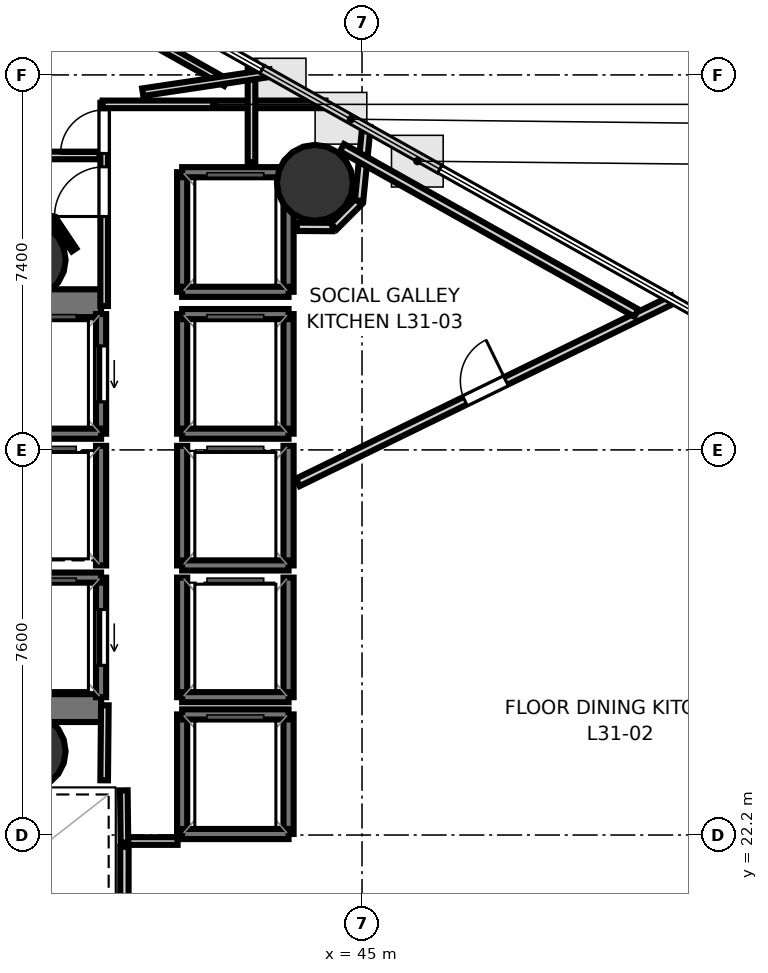
"""IFC4 building model, lengths in metres.
Left out: names, types, materials, properties, quantities, classifications, styles, units other than length and angle.
Written with IfcOpenShell. Run it as: python <this file> out.ifc"""

import sys

from ifc_helpers import new_model, si_unit, direction, frame, frame_2d, origin, origin_2d, place, context, subcontext, project, spatial, rectangle, hollow_circle, extrude, element, fill, save


model = new_model("IFC4")
c1 = context("Model", 3, precision=1e-05, world=origin(), true_north=direction((0.0, 1.0)))
c2 = subcontext(c1, "Body", "Model", "MODEL_VIEW")
j1 = project(units=[si_unit("LENGTHUNIT", "METRE"), si_unit("PLANEANGLEUNIT", "RADIAN")], contexts=[c1])
p1 = place(None, origin())
s1 = spatial("IfcSite", under=j1, at=p1, CompositionType="ELEMENT")
p2 = place(p1, origin())
s2 = spatial("IfcBuilding", under=s1, at=p2, CompositionType="ELEMENT")
p3 = place(p2, frame((0.0, 0.0, 123.7)))
s3 = spatial("IfcBuildingStorey", under=s2, at=p3, CompositionType="ELEMENT", Elevation=123.7)
p4 = place(p3, frame((29.23, 32.695, 0.0), z_axis=(0.0, 0.0, 1.0), x_axis=(1.0, 0.0, 0.0)))
e1 = element("IfcWall", 1, at=p4, inside=s3, PredefinedType="SHEAR", context=c2, shape_type="SweptSolid", body=[
    extrude(rectangle(XDim=10.62, YDim=0.55, at=frame_2d((5.31, 0.0))), origin(), (0.0, 0.0, 1.0), 3.52),
])
p5 = place(p4, frame((0.995, 0.0, 0.0)))
e2 = element("IfcOpeningElement", 2, at=p5, cuts=e1, PredefinedType="OPENING", context=c2, shape_type="SweptSolid", body=[
    extrude(rectangle(XDim=1.25, YDim=2.15, at=frame_2d((0.625, 1.075))), frame((0.0, 0.285, 0.0), z_axis=(0.0, -1.0, 0.0), x_axis=(1.0, 0.0, 0.0)), (0.0, 0.0, 1.0), 0.57),
])
p6 = place(p3, frame((29.23, 24.705, 0.0), z_axis=(0.0, 0.0, 1.0), x_axis=(1.0, 0.0, 0.0)))
e3 = element("IfcWall", 3, at=p6, inside=s3, PredefinedType="SHEAR", context=c2, shape_type="SweptSolid", body=[
    extrude(rectangle(XDim=10.62, YDim=0.55, at=frame_2d((5.31, 0.0))), origin(), (0.0, 0.0, 1.0), 3.52),
])
p7 = place(p6, frame((0.795, 0.0, 0.0)))
e4 = element("IfcOpeningElement", 4, at=p7, cuts=e3, PredefinedType="OPENING", context=c2, shape_type="SweptSolid", body=[
    extrude(rectangle(XDim=1.25, YDim=2.15, at=frame_2d((0.625, 1.075))), frame((0.0, 0.285, 0.0), z_axis=(0.0, -1.0, 0.0), x_axis=(1.0, 0.0, 0.0)), (0.0, 0.0, 1.0), 0.57),
])
for number, where, z_axis, x_axis in (
    (5, (38.4, 33.55, 0.0), (0.0, 0.0, 1.0), (1.0, 0.0, 0.0)),
    (6, (38.4, 23.85, 0.0), (0.0, 0.0, 1.0), (1.0, 0.0, 0.0)),
    (7, (44.071, 35.07, 0.0), (0.0, 0.0, 1.0), (1.0, 0.0, 0.0)),
):
    element("IfcColumn", number, at=place(p3, frame(where, z_axis=z_axis, x_axis=x_axis)), inside=s3, PredefinedType="COLUMN", context=c2, shape_type="SweptSolid", body=[
        extrude(hollow_circle(Radius=0.75, WallThickness=0.036, at=origin_2d()), origin(), (0.0, 0.0, 1.0), 3.7),
    ])
p8 = place(p3, frame((39.85, 30.12, 0.0), z_axis=(0.0, 0.0, 1.0), x_axis=(0.0, 1.0, 0.0)))
e8 = element("IfcWall", 8, at=p8, inside=s3, PredefinedType="SOLIDWALL", context=c2, shape_type="SweptSolid", body=[
    extrude(rectangle(XDim=2.36, YDim=0.2, at=frame_2d((1.18, 0.0))), origin(), (0.0, 0.0, 1.0), 3.52),
])
p9 = place(p8, frame((0.63, 0.0, 0.0)))
e9 = element("IfcOpeningElement", 9, at=p9, cuts=e8, PredefinedType="OPENING", context=c2, shape_type="SweptSolid", body=[
    extrude(rectangle(XDim=1.1, YDim=2.15, at=frame_2d((0.55, 1.075))), frame((0.0, 0.11, 0.0), z_axis=(0.0, -1.0, 0.0), x_axis=(1.0, 0.0, 0.0)), (0.0, 0.0, 1.0), 0.22),
])
p10 = place(p3, frame((37.75, 30.12, 0.0), z_axis=(0.0, 0.0, 1.0), x_axis=(1.0, 0.0, 0.0)))
e10 = element("IfcWall", 10, at=p10, inside=s3, PredefinedType="SOLIDWALL", context=c2, shape_type="SweptSolid", body=[
    extrude(rectangle(XDim=2.1, YDim=0.2, at=frame_2d((1.05, 0.0))), origin(), (0.0, 0.0, 1.0), 3.52),
])
p11 = place(p3, frame((39.85, 24.92, 0.0), z_axis=(0.0, 0.0, 1.0), x_axis=(0.0, 1.0, 0.0)))
e11 = element("IfcWall", 11, at=p11, inside=s3, PredefinedType="SOLIDWALL", context=c2, shape_type="SweptSolid", body=[
    extrude(rectangle(XDim=2.36, YDim=0.2, at=frame_2d((1.18, 0.0))), origin(), (0.0, 0.0, 1.0), 3.52),
])
p12 = place(p11, frame((0.63, 0.0, 0.0)))
e12 = element("IfcOpeningElement", 12, at=p12, cuts=e11, PredefinedType="OPENING", context=c2, shape_type="SweptSolid", body=[
    extrude(rectangle(XDim=1.1, YDim=2.15, at=frame_2d((0.55, 1.075))), frame((0.0, 0.11, 0.0), z_axis=(0.0, -1.0, 0.0), x_axis=(1.0, 0.0, 0.0)), (0.0, 0.0, 1.0), 0.22),
])
p13 = place(p3, frame((37.75, 27.28, 0.0), z_axis=(0.0, 0.0, 1.0), x_axis=(1.0, 0.0, 0.0)))
e13 = element("IfcWall", 13, at=p13, inside=s3, PredefinedType="SOLIDWALL", context=c2, shape_type="SweptSolid", body=[
    extrude(rectangle(XDim=2.1, YDim=0.2, at=frame_2d((1.05, 0.0))), origin(), (0.0, 0.0, 1.0), 3.52),
])
for number, where, z_axis, x_axis in (
    (14, (43.55, 30.12, 0.0), (0.0, 0.0, 1.0), (0.0, 1.0, 0.0)),
    (15, (41.45, 30.12, 0.0), (0.0, 0.0, 1.0), (0.0, 1.0, 0.0)),
):
    element("IfcWall", number, at=place(p3, frame(where, z_axis=z_axis, x_axis=x_axis)), inside=s3, PredefinedType="SOLIDWALL", context=c2, shape_type="SweptSolid", body=[
        extrude(rectangle(XDim=2.36, YDim=0.2, at=frame_2d((1.18, 0.0))), origin(), (0.0, 0.0, 1.0), 3.52),
    ])
for number, where, z_axis, x_axis in (
    (16, (41.45, 32.48, 0.0), (0.0, 0.0, 1.0), (1.0, 0.0, 0.0)),
    (17, (41.45, 30.12, 0.0), (0.0, 0.0, 1.0), (1.0, 0.0, 0.0)),
):
    element("IfcWall", number, at=place(p3, frame(where, z_axis=z_axis, x_axis=x_axis)), inside=s3, PredefinedType="SOLIDWALL", context=c2, shape_type="SweptSolid", body=[
        extrude(rectangle(XDim=2.1, YDim=0.2, at=frame_2d((1.05, 0.0))), origin(), (0.0, 0.0, 1.0), 3.52),
    ])
for number, where, z_axis, x_axis in (
    (18, (43.55, 27.52, 0.0), (0.0, 0.0, 1.0), (0.0, 1.0, 0.0)),
    (19, (41.45, 27.52, 0.0), (0.0, 0.0, 1.0), (0.0, 1.0, 0.0)),
):
    element("IfcWall", number, at=place(p3, frame(where, z_axis=z_axis, x_axis=x_axis)), inside=s3, PredefinedType="SOLIDWALL", context=c2, shape_type="SweptSolid", body=[
        extrude(rectangle(XDim=2.36, YDim=0.2, at=frame_2d((1.18, 0.0))), origin(), (0.0, 0.0, 1.0), 3.52),
    ])
p14 = place(p3, frame((41.45, 27.52, 0.0), z_axis=(0.0, 0.0, 1.0), x_axis=(1.0, 0.0, 0.0)))
e20 = element("IfcWall", 20, at=p14, inside=s3, PredefinedType="SOLIDWALL", context=c2, shape_type="SweptSolid", body=[
    extrude(rectangle(XDim=2.1, YDim=0.2, at=frame_2d((1.05, 0.0))), origin(), (0.0, 0.0, 1.0), 3.52),
])
for number, where, z_axis, x_axis in (
    (21, (43.55, 24.92, 0.0), (0.0, 0.0, 1.0), (0.0, 1.0, 0.0)),
    (22, (41.45, 24.92, 0.0), (0.0, 0.0, 1.0), (0.0, 1.0, 0.0)),
):
    element("IfcWall", number, at=place(p3, frame(where, z_axis=z_axis, x_axis=x_axis)), inside=s3, PredefinedType="SOLIDWALL", context=c2, shape_type="SweptSolid", body=[
        extrude(rectangle(XDim=2.36, YDim=0.2, at=frame_2d((1.18, 0.0))), origin(), (0.0, 0.0, 1.0), 3.52),
    ])
p15 = place(p3, frame((41.45, 24.92, 0.0), z_axis=(0.0, 0.0, 1.0), x_axis=(1.0, 0.0, 0.0)))
e23 = element("IfcWall", 23, at=p15, inside=s3, PredefinedType="SOLIDWALL", context=c2, shape_type="SweptSolid", body=[
    extrude(rectangle(XDim=2.1, YDim=0.2, at=frame_2d((1.05, 0.0))), origin(), (0.0, 0.0, 1.0), 3.52),
])
p16 = place(p3, frame((39.85, 27.52, 0.0), z_axis=(0.0, 0.0, 1.0), x_axis=(0.0, 1.0, 0.0)))
e24 = element("IfcWall", 24, at=p16, inside=s3, PredefinedType="SOLIDWALL", context=c2, shape_type="SweptSolid", body=[
    extrude(rectangle(XDim=2.36, YDim=0.2, at=frame_2d((1.18, 0.0))), origin(), (0.0, 0.0, 1.0), 3.52),
])
for number, where, z_axis, x_axis in (
    (25, (43.55, 22.22, 0.0), (0.0, 0.0, 1.0), (0.0, 1.0, 0.0)),
    (26, (41.45, 22.22, 0.0), (0.0, 0.0, 1.0), (0.0, 1.0, 0.0)),
):
    element("IfcWall", number, at=place(p3, frame(where, z_axis=z_axis, x_axis=x_axis)), inside=s3, PredefinedType="SOLIDWALL", context=c2, shape_type="SweptSolid", body=[
        extrude(rectangle(XDim=2.36, YDim=0.2, at=frame_2d((1.18, 0.0))), origin(), (0.0, 0.0, 1.0), 3.52),
    ])
for number, where, z_axis, x_axis in (
    (27, (41.45, 24.58, 0.0), (0.0, 0.0, 1.0), (1.0, 0.0, 0.0)),
    (28, (41.45, 22.22, 0.0), (0.0, 0.0, 1.0), (1.0, 0.0, 0.0)),
):
    element("IfcWall", number, at=place(p3, frame(where, z_axis=z_axis, x_axis=x_axis)), inside=s3, PredefinedType="SOLIDWALL", context=c2, shape_type="SweptSolid", body=[
        extrude(rectangle(XDim=2.1, YDim=0.2, at=frame_2d((1.05, 0.0))), origin(), (0.0, 0.0, 1.0), 3.52),
    ])
for number, where, z_axis, x_axis in (
    (29, (43.55, 32.92, 0.0), (0.0, 0.0, 1.0), (0.0, 1.0, 0.0)),
    (30, (41.45, 32.92, 0.0), (0.0, 0.0, 1.0), (0.0, 1.0, 0.0)),
):
    element("IfcWall", number, at=place(p3, frame(where, z_axis=z_axis, x_axis=x_axis)), inside=s3, PredefinedType="SOLIDWALL", context=c2, shape_type="SweptSolid", body=[
        extrude(rectangle(XDim=2.36, YDim=0.2, at=frame_2d((1.18, 0.0))), origin(), (0.0, 0.0, 1.0), 3.52),
    ])
for number, where, z_axis, x_axis in (
    (31, (41.45, 35.28, 0.0), (0.0, 0.0, 1.0), (1.0, 0.0, 0.0)),
    (32, (41.45, 32.92, 0.0), (0.0, 0.0, 1.0), (1.0, 0.0, 0.0)),
):
    element("IfcWall", number, at=place(p3, frame(where, z_axis=z_axis, x_axis=x_axis)), inside=s3, PredefinedType="SOLIDWALL", context=c2, shape_type="SweptSolid", body=[
        extrude(rectangle(XDim=2.1, YDim=0.2, at=frame_2d((1.05, 0.0))), origin(), (0.0, 0.0, 1.0), 3.52),
    ])
p17 = place(p3, frame((39.911, 32.64, 0.0), z_axis=(0.0, 0.0, 1.0), x_axis=(0.0, 1.0, 0.0)))
e33 = element("IfcWall", 33, at=p17, inside=s3, PredefinedType="PARTITIONING", context=c2, shape_type="SweptSolid", body=[
    extrude(rectangle(XDim=4.01, YDim=0.15, at=frame_2d((2.005, 0.0))), origin(), (0.0, 0.0, 1.0), 2.84),
])
p18 = place(p17, frame((3.01, 0.0, 0.0)))
e34 = element("IfcOpeningElement", 34, at=p18, cuts=e33, PredefinedType="OPENING", context=c2, shape_type="SweptSolid", body=[
    extrude(rectangle(XDim=0.86, YDim=2.05, at=frame_2d((0.43, 1.025))), frame((0.0, 0.085, 0.0), z_axis=(0.0, -1.0, 0.0), x_axis=(1.0, 0.0, 0.0)), (0.0, 0.0, 1.0), 0.17),
])
p19 = place(p17, frame((1.766, 0.0, 0.0)))
e35 = element("IfcOpeningElement", 35, at=p19, cuts=e33, PredefinedType="OPENING", context=c2, shape_type="SweptSolid", body=[
    extrude(rectangle(XDim=0.98, YDim=2.1, at=frame_2d((0.49, 1.05))), frame((0.0, 0.085, 0.0), z_axis=(0.0, -1.0, 0.0), x_axis=(1.0, 0.0, 0.0)), (0.0, 0.0, 1.0), 0.17),
])
p20 = place(p3, frame((39.88, 36.619, 0.0), z_axis=(0.0, 0.0, 1.0), x_axis=(1.0, 0.0, 0.0)))
e36 = element("IfcWall", 36, at=p20, inside=s3, PredefinedType="PARTITIONING", context=c2, shape_type="SweptSolid", body=[
    extrude(rectangle(XDim=4.399, YDim=0.15, at=frame_2d((2.199, 0.0))), origin(), (0.0, 0.0, 1.0), 2.84),
])
p21 = place(p3, frame((42.819, 37.447, 0.0), z_axis=(0.0, 0.0, 1.0), x_axis=(0.0, -1.0, 0.0)))
e37 = element("IfcWall", 37, at=p21, inside=s3, PredefinedType="PARTITIONING", context=c2, shape_type="SweptSolid", body=[
    extrude(rectangle(XDim=1.967, YDim=0.15, at=frame_2d((0.984, 0.0))), origin(), (0.0, 0.0, 1.0), 2.84),
])
p22 = place(p3, frame((41.36, 22.081, 0.0), z_axis=(0.0, 0.0, 1.0), x_axis=(-1.0, 0.0, 0.0)))
e38 = element("IfcWall", 38, at=p22, inside=s3, PredefinedType="PARTITIONING", context=c2, shape_type="SweptSolid", body=[
    extrude(rectangle(XDim=1.08, YDim=0.15, at=frame_2d((0.54, 0.0))), origin(), (0.0, 0.0, 1.0), 2.84),
])
p23 = place(p3, frame((40.311, 22.05, 0.0), z_axis=(0.0, 0.0, 1.0), x_axis=(-0.011836292006, 0.999929948642, 0.0)))
e39 = element("IfcWall", 39, at=p23, inside=s3, PredefinedType="PARTITIONING", context=c2, shape_type="SweptSolid", body=[
    extrude(rectangle(XDim=1.031, YDim=0.15, at=frame_2d((0.516, 0.0))), origin(), (0.0, 0.0, 1.0), 2.84),
])
p24 = place(p3, frame((39.911, 23.28, 0.0), z_axis=(0.0, 0.0, 1.0), x_axis=(0.009397771291, 0.999955839972, 0.0)))
e40 = element("IfcWall", 40, at=p24, inside=s3, PredefinedType="PARTITIONING", context=c2, shape_type="SweptSolid", body=[
    extrude(rectangle(XDim=1.481, YDim=0.15, at=frame_2d((0.74, 0.0))), origin(), (0.0, 0.0, 1.0), 2.84),
])
p25 = place(p3, frame((39.869, 38.423, 0.0), z_axis=(0.0, 0.0, 1.0), x_axis=(0.87196097956, -0.489575377368, 0.0)))
e41 = element("IfcWall", 41, at=p25, inside=s3, PredefinedType="PARTITIONING", context=c2, shape_type="SweptSolid", body=[
    extrude(rectangle(XDim=2.806, YDim=0.15, at=frame_2d((1.403, 0.0))), origin(), (0.0, 0.0, 1.0), 2.84),
])
p26 = place(p3, frame((43.186, 37.236, 0.0), z_axis=(0.0, 0.0, 1.0), x_axis=(-0.9889539611, -0.148223017191, 0.0)))
e42 = element("IfcWall", 42, at=p26, inside=s3, PredefinedType="PARTITIONING", context=c2, shape_type="SweptSolid", body=[
    extrude(rectangle(XDim=2.542, YDim=0.15, at=frame_2d((1.271, 0.0))), origin(), (0.0, 0.0, 1.0), 2.84),
])
p27 = place(p3, frame((39.818, 35.611, 0.0), z_axis=(0.0, 0.0, 1.0), x_axis=(-1.0, 0.0, 0.0)))
e43 = element("IfcWall", 43, at=p27, inside=s3, PredefinedType="PARTITIONING", context=c2, shape_type="SweptSolid", body=[
    extrude(rectangle(XDim=5.318, YDim=0.15, at=frame_2d((2.659, 0.0))), origin(), (0.0, 0.0, 1.0), 2.84),
])
p28 = place(p3, frame((40.31, 17.972, 0.0), z_axis=(0.0, 0.0, 1.0), x_axis=(0.000305362145, 0.999999953377, 0.0)))
e44 = element("IfcWall", 44, at=p28, inside=s3, PredefinedType="PLUMBINGWALL", context=c2, shape_type="SweptSolid", body=[
    extrude(rectangle(XDim=3.998, YDim=0.165, at=frame_2d((1.999, 0.0))), origin(), (0.0, 0.0, 1.0), 2.84),
])
p29 = place(p3, frame((43.734, 29.159, 0.0), z_axis=(0.0, 0.0, 1.0), x_axis=(0.898802601671, 0.438353605244, 0.0)))
e45 = element("IfcWall", 45, at=p29, inside=s3, PredefinedType="PLUMBINGWALL", context=c2, shape_type="SweptSolid", body=[
    extrude(rectangle(XDim=8.243, YDim=0.165, at=frame_2d((4.122, 0.0))), origin(), (0.0, 0.0, 1.0), 2.84),
])
p30 = place(p29, frame((3.669, 0.0, 0.0)))
e46 = element("IfcOpeningElement", 46, at=p30, cuts=e45, PredefinedType="OPENING", context=c2, shape_type="SweptSolid", body=[
    extrude(rectangle(XDim=0.9, YDim=2.1, at=frame_2d((0.45, 1.05))), frame((0.0, 0.093, 0.0), z_axis=(0.0, -1.0, 0.0), x_axis=(1.0, 0.0, 0.0)), (0.0, 0.0, 1.0), 0.185),
])
p31 = place(p3, frame((43.714, 34.203, 0.0), z_axis=(0.0, 0.0, 1.0), x_axis=(0.999978344434, -0.006581083666, 0.0)))
e47 = element("IfcWall", 47, at=p31, inside=s3, PredefinedType="PLUMBINGWALL", context=c2, shape_type="SweptSolid", body=[
    extrude(rectangle(XDim=0.705, YDim=0.165, at=frame_2d((0.353, 0.0))), origin(), (0.0, 0.0, 1.0), 2.84),
])
p32 = place(p3, frame((44.441, 34.207, 0.0), z_axis=(0.0, 0.0, 1.0), x_axis=(0.707106781187, 0.707106781187, 0.0)))
e48 = element("IfcWall", 48, at=p32, inside=s3, PredefinedType="PLUMBINGWALL", context=c2, shape_type="SweptSolid", body=[
    extrude(rectangle(XDim=0.696, YDim=0.165, at=frame_2d((0.348, 0.0))), origin(), (0.0, 0.0, 1.0), 2.84),
])
p33 = place(p3, frame((44.943, 34.719, 0.0), z_axis=(0.0, 0.0, 1.0), x_axis=(0.0980832699, 0.99517821126, 0.0)))
e49 = element("IfcWall", 49, at=p33, inside=s3, PredefinedType="PLUMBINGWALL", context=c2, shape_type="SweptSolid", body=[
    extrude(rectangle(XDim=1.464, YDim=0.165, at=frame_2d((0.732, 0.0))), origin(), (0.0, 0.0, 1.0), 2.84),
])
p34 = place(p3, frame((44.605, 35.764, 0.0), z_axis=(0.0, 0.0, 1.0), x_axis=(0.871956893642, -0.489582654544, 0.0)))
e50 = element("IfcWall", 50, at=p34, inside=s3, PredefinedType="PLUMBINGWALL", context=c2, shape_type="SweptSolid", body=[
    extrude(rectangle(XDim=6.663, YDim=0.165, at=frame_2d((3.332, 0.0))), origin(), (0.0, 0.0, 1.0), 2.84),
])
p35 = place(p3, frame((39.317, 33.748, 0.0), z_axis=(0.0, 0.0, 1.0), x_axis=(-0.556649926744, 0.830747169153, 0.0)))
e51 = element("IfcWall", 51, at=p35, inside=s3, PredefinedType="PARTITIONING", context=c2, shape_type="SweptSolid", body=[
    extrude(rectangle(XDim=0.693, YDim=0.105, at=frame_2d((0.346, 0.0))), origin(), (0.0, 0.0, 1.0), 2.84),
])
p36 = place(p3, frame((38.912, 34.337, 0.0), z_axis=(0.0, 0.0, 1.0), x_axis=(-0.98075554424, 0.195239756305, 0.0)))
e52 = element("IfcWall", 52, at=p36, inside=s3, PredefinedType="PARTITIONING", context=c2, shape_type="SweptSolid", body=[
    extrude(rectangle(XDim=0.697, YDim=0.14, at=frame_2d((0.348, 0.0))), origin(), (0.0, 0.0, 1.0), 2.84),
])
p37 = place(p9, origin())
e53 = element("IfcDoor", 53, at=p37, inside=s3, OperationType="SLIDING_TO_LEFT", PredefinedType="DOOR", context=c2, shape_type="SweptSolid", body=[
    extrude(rectangle(XDim=1.1, YDim=2.15, at=frame_2d((0.55, 1.075))), frame((0.0, 0.025, 0.0), z_axis=(0.0, -1.0, 0.0), x_axis=(1.0, 0.0, 0.0)), (0.0, 0.0, 1.0), 0.05),
])
fill(e9, e53)
p38 = place(p12, origin())
e54 = element("IfcDoor", 54, at=p38, inside=s3, OperationType="SLIDING_TO_LEFT", PredefinedType="DOOR", context=c2, shape_type="SweptSolid", body=[
    extrude(rectangle(XDim=1.1, YDim=2.15, at=frame_2d((0.55, 1.075))), frame((0.0, 0.025, 0.0), z_axis=(0.0, -1.0, 0.0), x_axis=(1.0, 0.0, 0.0)), (0.0, 0.0, 1.0), 0.05),
])
fill(e12, e54)
p39 = place(p18, origin())
e55 = element("IfcDoor", 55, at=p39, inside=s3, OperationType="SINGLE_SWING_LEFT", PredefinedType="DOOR", context=c2, shape_type="SweptSolid", body=[
    extrude(rectangle(XDim=0.86, YDim=2.05, at=frame_2d((0.43, 1.025))), frame((0.0, 0.025, 0.0), z_axis=(0.0, -1.0, 0.0), x_axis=(1.0, 0.0, 0.0)), (0.0, 0.0, 1.0), 0.05),
])
fill(e34, e55)
p40 = place(p19, origin())
e56 = element("IfcDoor", 56, at=p40, inside=s3, OperationType="SINGLE_SWING_LEFT", PredefinedType="DOOR", context=c2, shape_type="SweptSolid", body=[
    extrude(rectangle(XDim=0.98, YDim=2.1, at=frame_2d((0.49, 1.05))), frame((0.0, 0.025, 0.0), z_axis=(0.0, -1.0, 0.0), x_axis=(1.0, 0.0, 0.0)), (0.0, 0.0, 1.0), 0.05),
])
fill(e35, e56)
p41 = place(p30, origin())
e57 = element("IfcDoor", 57, at=p41, inside=s3, OperationType="SINGLE_SWING_RIGHT", PredefinedType="DOOR", context=c2, shape_type="SweptSolid", body=[
    extrude(rectangle(XDim=0.9, YDim=2.1, at=frame_2d((0.45, 1.05))), frame((0.0, 0.025, 0.0), z_axis=(0.0, -1.0, 0.0), x_axis=(1.0, 0.0, 0.0)), (0.0, 0.0, 1.0), 0.05),
])
fill(e46, e57)
save(model, sys.argv[1])
